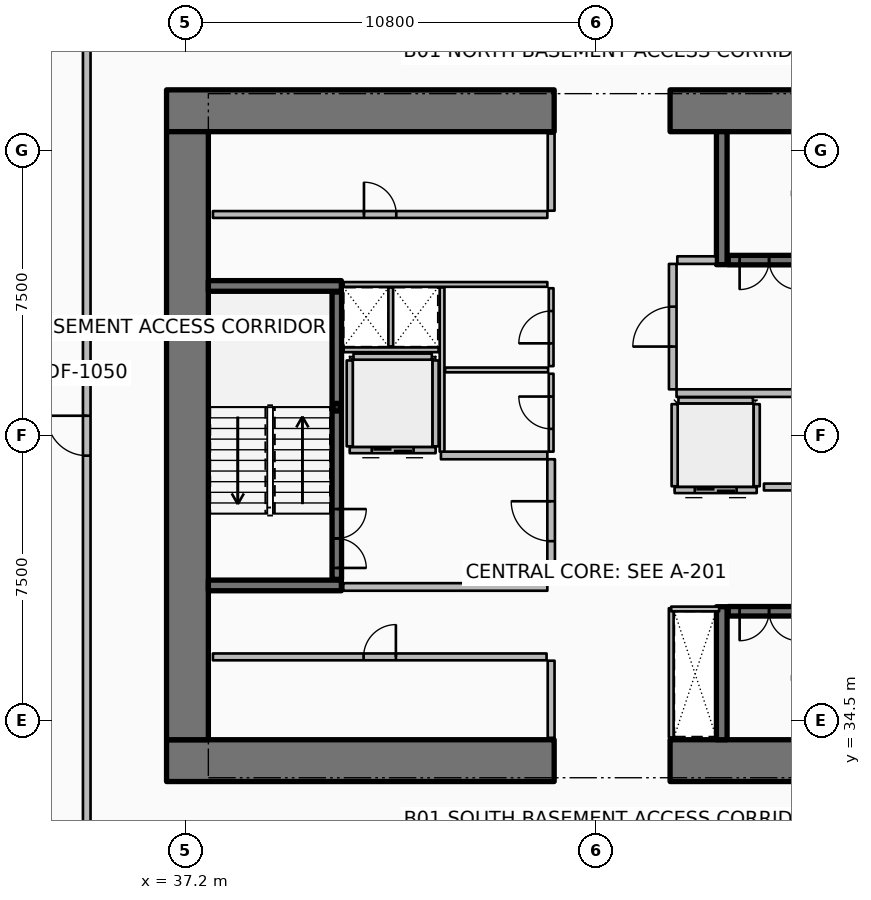
"""IFC4 building model, lengths in metres.
Left out: names, types, materials, properties, quantities, classifications, styles, units other than length and angle.
Written with IfcOpenShell. Run it as: python <this file> out.ifc"""

import sys

from ifc_helpers import new_model, si_unit, direction, frame, frame_2d, origin, origin_2d, place, context, subcontext, project, spatial, rectangle, hollow_rectangle, extrude, element, fill, save


model = new_model("IFC4")
c1 = context("Model", 3, precision=1e-05, world=origin(), true_north=direction((0.0, 1.0)))
c2 = subcontext(c1, "Body", "Model", "MODEL_VIEW")
j1 = project(units=[si_unit("LENGTHUNIT", "METRE"), si_unit("PLANEANGLEUNIT", "RADIAN")], contexts=[c1])
p1 = place(None, origin())
s1 = spatial("IfcSite", under=j1, at=p1, CompositionType="ELEMENT")
p2 = place(p1, origin())
s2 = spatial("IfcBuilding", under=s1, at=p2, CompositionType="ELEMENT")
p3 = place(p2, frame((0.0, 0.0, -3.8)))
s3 = spatial("IfcBuildingStorey", under=s2, at=p3, CompositionType="ELEMENT", Elevation=-3.8)
for number, where, z_axis, x_axis in (
    (1, (36.7, 33.45, 0.0), (0.0, 0.0, 1.0), (1.0, 0.0, 0.0)),
    (2, (49.95, 33.45, 0.0), (0.0, 0.0, 1.0), (1.0, 0.0, 0.0)),
    (3, (36.7, 50.55, 0.0), (0.0, 0.0, 1.0), (1.0, 0.0, 0.0)),
    (4, (49.95, 50.55, 0.0), (0.0, 0.0, 1.0), (1.0, 0.0, 0.0)),
):
    element("IfcWall", number, at=place(p3, frame(where, z_axis=z_axis, x_axis=x_axis)), inside=s3, PredefinedType="SHEAR", context=c2, shape_type="SweptSolid", body=[
        extrude(rectangle(XDim=10.2, YDim=1.1, at=frame_2d((5.1, 0.0))), origin(), (0.0, 0.0, 1.0), 3.8),
    ])
p4 = place(p3, frame((37.25, 34.0, 0.0), z_axis=(0.0, 0.0, 1.0), x_axis=(0.0, 1.0, 0.0)))
e5 = element("IfcWall", 5, at=p4, inside=s3, PredefinedType="SHEAR", context=c2, shape_type="SweptSolid", body=[
    extrude(rectangle(XDim=16.0, YDim=1.1, at=frame_2d((8.0, 0.0))), origin(), (0.0, 0.0, 1.0), 3.8),
])
for number, where, z_axis, x_axis in (
    (6, (37.8, 38.06, 0.0), (0.0, 0.0, 1.0), (1.0, 0.0, 0.0)),
    (7, (37.8, 45.94, 0.0), (0.0, 0.0, 1.0), (1.0, 0.0, 0.0)),
    (8, (51.31, 46.5, 0.0), (0.0, 0.0, 1.0), (0.0, 1.0, 0.0)),
    (9, (51.31, 34.0, 0.0), (0.0, 0.0, 1.0), (0.0, 1.0, 0.0)),
):
    element("IfcWall", number, at=place(p3, frame(where, z_axis=z_axis, x_axis=x_axis)), inside=s3, PredefinedType="SHEAR", context=c2, shape_type="SweptSolid", body=[
        extrude(rectangle(XDim=3.5, YDim=0.28, at=frame_2d((1.75, 0.0))), origin(), (0.0, 0.0, 1.0), 3.8),
    ])
p5 = place(p3, frame((41.18, 42.75, 0.0), z_axis=(0.0, 0.0, 1.0), x_axis=(1.0, 0.0, 0.0)))
e10 = element("IfcColumn", 10, at=p5, inside=s3, PredefinedType="COLUMN", context=c2, shape_type="SweptSolid", body=[
    extrude(hollow_rectangle(XDim=0.2, YDim=0.2, WallThickness=0.01, InnerFilletRadius=0.01, OuterFilletRadius=0.02, at=origin_2d()), origin(), (0.0, 0.0, 1.0), 1.695),
])
p6 = place(p3, frame((41.18, 38.22, 0.0), z_axis=(0.0, 0.0, 1.0), x_axis=(0.0, 1.0, 0.0)))
e11 = element("IfcWall", 11, at=p6, inside=s3, PredefinedType="SOLIDWALL", context=c2, shape_type="SweptSolid", body=[
    extrude(rectangle(XDim=7.56, YDim=0.25, at=frame_2d((3.78, 0.0))), origin(), (0.0, 0.0, 1.0), 3.48),
])
p7 = place(p6, frame((0.3, 0.0, 0.0)))
e12 = element("IfcOpeningElement", 12, at=p7, cuts=e11, PredefinedType="OPENING", context=c2, shape_type="SweptSolid", body=[
    extrude(rectangle(XDim=1.55, YDim=2.15, at=frame_2d((0.775, 1.075))), frame((0.0, 0.135, 0.0), z_axis=(0.0, -1.0, 0.0), x_axis=(1.0, 0.0, 0.0)), (0.0, 0.0, 1.0), 0.27),
])
p8 = place(p3, frame((51.48, 46.62, 0.0), z_axis=(0.0, 0.0, 1.0), x_axis=(1.0, 0.0, 0.0)))
e13 = element("IfcWall", 13, at=p8, inside=s3, PredefinedType="SOLIDWALL", context=c2, shape_type="SweptSolid", body=[
    extrude(rectangle(XDim=7.54, YDim=0.25, at=frame_2d((3.77, 0.0))), origin(), (0.0, 0.0, 1.0), 3.48),
])
p9 = place(p8, frame((0.3, 0.0, 0.0)))
e14 = element("IfcOpeningElement", 14, at=p9, cuts=e13, PredefinedType="OPENING", context=c2, shape_type="SweptSolid", body=[
    extrude(rectangle(XDim=1.55, YDim=2.15, at=frame_2d((0.775, 1.075))), frame((0.0, 0.135, 0.0), z_axis=(0.0, -1.0, 0.0), x_axis=(1.0, 0.0, 0.0)), (0.0, 0.0, 1.0), 0.27),
])
p10 = place(p3, frame((51.48, 37.38, 0.0), z_axis=(0.0, 0.0, 1.0), x_axis=(1.0, 0.0, 0.0)))
e15 = element("IfcWall", 15, at=p10, inside=s3, PredefinedType="SOLIDWALL", context=c2, shape_type="SweptSolid", body=[
    extrude(rectangle(XDim=7.54, YDim=0.25, at=frame_2d((3.77, 0.0))), origin(), (0.0, 0.0, 1.0), 3.48),
])
p11 = place(p10, frame((0.3, 0.0, 0.0)))
e16 = element("IfcOpeningElement", 16, at=p11, cuts=e15, PredefinedType="OPENING", context=c2, shape_type="SweptSolid", body=[
    extrude(rectangle(XDim=1.55, YDim=2.15, at=frame_2d((0.775, 1.075))), frame((0.0, 0.135, 0.0), z_axis=(0.0, -1.0, 0.0), x_axis=(1.0, 0.0, 0.0)), (0.0, 0.0, 1.0), 0.27),
])
p12 = place(p3, frame((43.78, 41.62, 0.0), z_axis=(0.0, 0.0, 1.0), x_axis=(-1.0, 0.0, 0.0)))
e17 = element("IfcWall", 17, at=p12, inside=s3, PredefinedType="PARTITIONING", context=c2, shape_type="SweptSolid", body=[
    extrude(rectangle(XDim=2.26, YDim=0.16, at=frame_2d((1.13, 0.0))), origin(), (0.0, 0.0, 1.0), 3.48),
])
p13 = place(p12, frame((0.58, 0.0, 0.0)))
e18 = element("IfcOpeningElement", 18, at=p13, cuts=e17, PredefinedType="OPENING", context=c2, shape_type="SweptSolid", body=[
    extrude(rectangle(XDim=1.1, YDim=2.1, at=frame_2d((0.55, 1.05))), frame((0.0, 0.09, 0.0), z_axis=(0.0, -1.0, 0.0), x_axis=(1.0, 0.0, 0.0)), (0.0, 0.0, 1.0), 0.18),
])
for number, where, z_axis, x_axis in (
    (19, (43.78, 41.72, 0.0), (0.0, 0.0, 1.0), (0.0, 1.0, 0.0)),
    (20, (41.52, 41.72, 0.0), (0.0, 0.0, 1.0), (0.0, 1.0, 0.0)),
):
    element("IfcWall", number, at=place(p3, frame(where, z_axis=z_axis, x_axis=x_axis)), inside=s3, PredefinedType="PARTITIONING", context=c2, shape_type="SweptSolid", body=[
        extrude(rectangle(XDim=2.26, YDim=0.16, at=frame_2d((1.13, 0.0))), origin(), (0.0, 0.0, 1.0), 3.48),
    ])
p14 = place(p3, frame((41.62, 44.08, 0.0), z_axis=(0.0, 0.0, 1.0), x_axis=(1.0, 0.0, 0.0)))
e21 = element("IfcWall", 21, at=p14, inside=s3, PredefinedType="PARTITIONING", context=c2, shape_type="SweptSolid", body=[
    extrude(rectangle(XDim=2.06, YDim=0.16, at=frame_2d((1.03, 0.0))), origin(), (0.0, 0.0, 1.0), 3.48),
])
p15 = place(p3, frame((52.23, 40.57, 0.0), z_axis=(0.0, 0.0, 1.0), x_axis=(-1.0, 0.0, 0.0)))
e22 = element("IfcWall", 22, at=p15, inside=s3, PredefinedType="PARTITIONING", context=c2, shape_type="SweptSolid", body=[
    extrude(rectangle(XDim=2.16, YDim=0.16, at=frame_2d((1.08, 0.0))), origin(), (0.0, 0.0, 1.0), 3.48),
])
p16 = place(p15, frame((0.53, 0.0, 0.0)))
e23 = element("IfcOpeningElement", 23, at=p16, cuts=e22, PredefinedType="OPENING", context=c2, shape_type="SweptSolid", body=[
    extrude(rectangle(XDim=1.1, YDim=2.1, at=frame_2d((0.55, 1.05))), frame((0.0, 0.09, 0.0), z_axis=(0.0, -1.0, 0.0), x_axis=(1.0, 0.0, 0.0)), (0.0, 0.0, 1.0), 0.18),
])
for number, where, z_axis, x_axis in (
    (24, (52.23, 40.67, 0.0), (0.0, 0.0, 1.0), (0.0, 1.0, 0.0)),
    (25, (50.07, 40.67, 0.0), (0.0, 0.0, 1.0), (0.0, 1.0, 0.0)),
):
    element("IfcWall", number, at=place(p3, frame(where, z_axis=z_axis, x_axis=x_axis)), inside=s3, PredefinedType="PARTITIONING", context=c2, shape_type="SweptSolid", body=[
        extrude(rectangle(XDim=2.16, YDim=0.16, at=frame_2d((1.08, 0.0))), origin(), (0.0, 0.0, 1.0), 3.48),
    ])
p17 = place(p3, frame((50.17, 42.93, 0.0), z_axis=(0.0, 0.0, 1.0), x_axis=(1.0, 0.0, 0.0)))
e26 = element("IfcWall", 26, at=p17, inside=s3, PredefinedType="PARTITIONING", context=c2, shape_type="SweptSolid", body=[
    extrude(rectangle(XDim=1.96, YDim=0.16, at=frame_2d((0.98, 0.0))), origin(), (0.0, 0.0, 1.0), 3.48),
])
p18 = place(p3, frame((37.92, 36.18, 0.0), z_axis=(0.0, 0.0, 1.0), x_axis=(1.0, 0.0, 0.0)))
e27 = element("IfcWall", 27, at=p18, inside=s3, PredefinedType="PARTITIONING", context=c2, shape_type="SweptSolid", body=[
    extrude(rectangle(XDim=8.78, YDim=0.18, at=frame_2d((4.39, 0.0))), origin(), (0.0, 0.0, 1.0), 3.48),
])
p19 = place(p18, frame((3.965, 0.0, 0.0)))
e28 = element("IfcOpeningElement", 28, at=p19, cuts=e27, PredefinedType="OPENING", context=c2, shape_type="SweptSolid", body=[
    extrude(rectangle(XDim=0.85, YDim=2.06, at=frame_2d((0.425, 1.03))), frame((0.0, 0.1, 0.0), z_axis=(0.0, -1.0, 0.0), x_axis=(1.0, 0.0, 0.0)), (0.0, 0.0, 1.0), 0.2),
])
p20 = place(p3, frame((46.82, 34.05, 0.0), z_axis=(0.0, 0.0, 1.0), x_axis=(0.0, 1.0, 0.0)))
e29 = element("IfcWall", 29, at=p20, inside=s3, PredefinedType="PARTITIONING", context=c2, shape_type="SweptSolid", body=[
    extrude(rectangle(XDim=2.03, YDim=0.18, at=frame_2d((1.015, 0.0))), origin(), (0.0, 0.0, 1.0), 3.48),
])
p21 = place(p3, frame((37.92, 47.82, 0.0), z_axis=(0.0, 0.0, 1.0), x_axis=(1.0, 0.0, 0.0)))
e30 = element("IfcWall", 30, at=p21, inside=s3, PredefinedType="PARTITIONING", context=c2, shape_type="SweptSolid", body=[
    extrude(rectangle(XDim=8.8, YDim=0.18, at=frame_2d((4.4, 0.0))), origin(), (0.0, 0.0, 1.0), 3.48),
])
p22 = place(p21, frame((3.975, 0.0, 0.0)))
e31 = element("IfcOpeningElement", 31, at=p22, cuts=e30, PredefinedType="OPENING", context=c2, shape_type="SweptSolid", body=[
    extrude(rectangle(XDim=0.85, YDim=2.06, at=frame_2d((0.425, 1.03))), frame((0.0, 0.1, 0.0), z_axis=(0.0, -1.0, 0.0), x_axis=(1.0, 0.0, 0.0)), (0.0, 0.0, 1.0), 0.2),
])
p23 = place(p3, frame((46.82, 47.92, 0.0), z_axis=(0.0, 0.0, 1.0), x_axis=(0.0, 1.0, 0.0)))
e32 = element("IfcWall", 32, at=p23, inside=s3, PredefinedType="PARTITIONING", context=c2, shape_type="SweptSolid", body=[
    extrude(rectangle(XDim=2.03, YDim=0.18, at=frame_2d((1.015, 0.0))), origin(), (0.0, 0.0, 1.0), 3.48),
])
p24 = place(p3, frame((52.42, 40.65, 0.0), z_axis=(0.0, 0.0, 1.0), x_axis=(1.0, 0.0, 0.0)))
e33 = element("IfcWall", 33, at=p24, inside=s3, PredefinedType="PARTITIONING", context=c2, shape_type="SweptSolid", body=[
    extrude(rectangle(XDim=6.5, YDim=0.18, at=frame_2d((3.25, 0.0))), origin(), (0.0, 0.0, 1.0), 3.48),
])
p25 = place(p24, frame((2.825, 0.0, 0.0)))
e34 = element("IfcOpeningElement", 34, at=p25, cuts=e33, PredefinedType="OPENING", context=c2, shape_type="SweptSolid", body=[
    extrude(rectangle(XDim=0.85, YDim=2.06, at=frame_2d((0.425, 1.03))), frame((0.0, 0.1, 0.0), z_axis=(0.0, -1.0, 0.0), x_axis=(1.0, 0.0, 0.0)), (0.0, 0.0, 1.0), 0.2),
])
p26 = place(p3, frame((41.35, 38.02, 0.0), z_axis=(0.0, 0.0, 1.0), x_axis=(1.0, 0.0, 0.0)))
e35 = element("IfcWall", 35, at=p26, inside=s3, PredefinedType="PARTITIONING", context=c2, shape_type="SweptSolid", body=[
    extrude(rectangle(XDim=5.37, YDim=0.2, at=frame_2d((2.685, 0.0))), origin(), (0.0, 0.0, 1.0), 3.48),
])
p27 = place(p3, frame((43.92, 41.48, 0.0), z_axis=(0.0, 0.0, 1.0), x_axis=(1.0, 0.0, 0.0)))
e36 = element("IfcWall", 36, at=p27, inside=s3, PredefinedType="PARTITIONING", context=c2, shape_type="SweptSolid", body=[
    extrude(rectangle(XDim=2.8, YDim=0.2, at=frame_2d((1.4, 0.0))), origin(), (0.0, 0.0, 1.0), 3.48),
])
p28 = place(p3, frame((46.82, 38.12, 0.0), z_axis=(0.0, 0.0, 1.0), x_axis=(0.0, 1.0, 0.0)))
e37 = element("IfcWall", 37, at=p28, inside=s3, PredefinedType="PARTITIONING", context=c2, shape_type="SweptSolid", body=[
    extrude(rectangle(XDim=3.26, YDim=0.2, at=frame_2d((1.63, 0.0))), origin(), (0.0, 0.0, 1.0), 3.48),
])
p29 = place(p28, frame((1.105, 0.0, 0.0)))
e38 = element("IfcOpeningElement", 38, at=p29, cuts=e37, PredefinedType="OPENING", context=c2, shape_type="SweptSolid", body=[
    extrude(rectangle(XDim=1.05, YDim=2.1, at=frame_2d((0.525, 1.05))), frame((0.0, 0.11, 0.0), z_axis=(0.0, -1.0, 0.0), x_axis=(1.0, 0.0, 0.0)), (0.0, 0.0, 1.0), 0.22),
])
p30 = place(p3, frame((50.12, 43.12, 0.0), z_axis=(0.0, 0.0, 1.0), x_axis=(1.0, 0.0, 0.0)))
e39 = element("IfcWall", 39, at=p30, inside=s3, PredefinedType="PARTITIONING", context=c2, shape_type="SweptSolid", body=[
    extrude(rectangle(XDim=8.88, YDim=0.2, at=frame_2d((4.44, 0.0))), origin(), (0.0, 0.0, 1.0), 3.48),
])
p31 = place(p3, frame((50.14, 46.62, 0.0), z_axis=(0.0, 0.0, 1.0), x_axis=(1.0, 0.0, 0.0)))
e40 = element("IfcWall", 40, at=p31, inside=s3, PredefinedType="PARTITIONING", context=c2, shape_type="SweptSolid", body=[
    extrude(rectangle(XDim=1.02, YDim=0.2, at=frame_2d((0.51, 0.0))), origin(), (0.0, 0.0, 1.0), 3.48),
])
p32 = place(p3, frame((50.02, 43.22, 0.0), z_axis=(0.0, 0.0, 1.0), x_axis=(0.0, 1.0, 0.0)))
e41 = element("IfcWall", 41, at=p32, inside=s3, PredefinedType="PARTITIONING", context=c2, shape_type="SweptSolid", body=[
    extrude(rectangle(XDim=3.3, YDim=0.2, at=frame_2d((1.65, 0.0))), origin(), (0.0, 0.0, 1.0), 3.48),
])
p33 = place(p32, frame((1.125, 0.0, 0.0)))
e42 = element("IfcOpeningElement", 42, at=p33, cuts=e41, PredefinedType="OPENING", context=c2, shape_type="SweptSolid", body=[
    extrude(rectangle(XDim=1.05, YDim=2.1, at=frame_2d((0.525, 1.05))), frame((0.0, 0.11, 0.0), z_axis=(0.0, -1.0, 0.0), x_axis=(1.0, 0.0, 0.0)), (0.0, 0.0, 1.0), 0.22),
])
p34 = place(p3, frame((41.36, 45.98, 0.0), z_axis=(0.0, 0.0, 1.0), x_axis=(1.0, 0.0, 0.0)))
e43 = element("IfcWall", 43, at=p34, inside=s3, PredefinedType="PARTITIONING", context=c2, shape_type="SweptSolid", body=[
    extrude(rectangle(XDim=5.36, YDim=0.125, at=frame_2d((2.68, 0.0))), origin(), (0.0, 0.0, 1.0), 2.92),
])
p35 = place(p3, frame((41.36, 44.26, 0.0), z_axis=(0.0, 0.0, 1.0), x_axis=(1.0, 0.0, 0.0)))
e44 = element("IfcWall", 44, at=p35, inside=s3, PredefinedType="PARTITIONING", context=c2, shape_type="SweptSolid", body=[
    extrude(rectangle(XDim=2.5, YDim=0.125, at=frame_2d((1.25, 0.0))), origin(), (0.0, 0.0, 1.0), 2.92),
])
p36 = place(p3, frame((42.6, 44.35, 0.0), z_axis=(0.0, 0.0, 1.0), x_axis=(0.0, 1.0, 0.0)))
e45 = element("IfcWall", 45, at=p36, inside=s3, PredefinedType="PARTITIONING", context=c2, shape_type="SweptSolid", body=[
    extrude(rectangle(XDim=1.55, YDim=0.125, at=frame_2d((0.775, 0.0))), origin(), (0.0, 0.0, 1.0), 2.92),
])
p37 = place(p3, frame((49.98, 34.06, 0.0), z_axis=(0.0, 0.0, 1.0), x_axis=(0.0, 1.0, 0.0)))
e46 = element("IfcWall", 46, at=p37, inside=s3, PredefinedType="PARTITIONING", context=c2, shape_type="SweptSolid", body=[
    extrude(rectangle(XDim=3.4, YDim=0.125, at=frame_2d((1.7, 0.0))), origin(), (0.0, 0.0, 1.0), 2.92),
])
p38 = place(p3, frame((49.98, 37.44, 0.0), z_axis=(0.0, 0.0, 1.0), x_axis=(1.0, 0.0, 0.0)))
e47 = element("IfcWall", 47, at=p38, inside=s3, PredefinedType="PARTITIONING", context=c2, shape_type="SweptSolid", body=[
    extrude(rectangle(XDim=1.26, YDim=0.125, at=frame_2d((0.63, 0.0))), origin(), (0.0, 0.0, 1.0), 2.92),
])
p39 = place(p3, frame((43.95, 41.58, 0.0), z_axis=(0.0, 0.0, 1.0), x_axis=(0.0, 1.0, 0.0)))
e48 = element("IfcWall", 48, at=p39, inside=s3, PredefinedType="PARTITIONING", context=c2, shape_type="SweptSolid", body=[
    extrude(rectangle(XDim=4.32, YDim=0.125, at=frame_2d((2.16, 0.0))), origin(), (0.0, 0.0, 1.0), 2.92),
])
p40 = place(p3, frame((44.03, 43.73, 0.0), z_axis=(0.0, 0.0, 1.0), x_axis=(1.0, 0.0, 0.0)))
e49 = element("IfcWall", 49, at=p40, inside=s3, PredefinedType="PARTITIONING", context=c2, shape_type="SweptSolid", body=[
    extrude(rectangle(XDim=2.71, YDim=0.125, at=frame_2d((1.355, 0.0))), origin(), (0.0, 0.0, 1.0), 2.92),
])
p41 = place(p3, frame((46.82, 41.58, 0.0), z_axis=(0.0, 0.0, 1.0), x_axis=(0.0, 1.0, 0.0)))
e50 = element("IfcWall", 50, at=p41, inside=s3, PredefinedType="PARTITIONING", context=c2, shape_type="SweptSolid", body=[
    extrude(rectangle(XDim=2.05, YDim=0.125, at=frame_2d((1.025, 0.0))), origin(), (0.0, 0.0, 1.0), 2.92),
])
p42 = place(p41, frame((0.6, 0.0, 0.0)))
e51 = element("IfcOpeningElement", 51, at=p42, cuts=e50, PredefinedType="OPENING", context=c2, shape_type="SweptSolid", body=[
    extrude(rectangle(XDim=0.85, YDim=2.06, at=frame_2d((0.425, 1.03))), frame((0.0, 0.073, 0.0), z_axis=(0.0, -1.0, 0.0), x_axis=(1.0, 0.0, 0.0)), (0.0, 0.0, 1.0), 0.145),
])
p43 = place(p3, frame((46.82, 43.83, 0.0), z_axis=(0.0, 0.0, 1.0), x_axis=(0.0, 1.0, 0.0)))
e52 = element("IfcWall", 52, at=p43, inside=s3, PredefinedType="PARTITIONING", context=c2, shape_type="SweptSolid", body=[
    extrude(rectangle(XDim=2.05, YDim=0.125, at=frame_2d((1.025, 0.0))), origin(), (0.0, 0.0, 1.0), 2.92),
])
p44 = place(p43, frame((0.6, 0.0, 0.0)))
e53 = element("IfcOpeningElement", 53, at=p44, cuts=e52, PredefinedType="OPENING", context=c2, shape_type="SweptSolid", body=[
    extrude(rectangle(XDim=0.85, YDim=2.06, at=frame_2d((0.425, 1.03))), frame((0.0, 0.073, 0.0), z_axis=(0.0, -1.0, 0.0), x_axis=(1.0, 0.0, 0.0)), (0.0, 0.0, 1.0), 0.145),
])
p45 = place(p3, frame((34.6, 30.95, 0.0), z_axis=(0.0, 0.0, 1.0), x_axis=(0.0, 1.0, 0.0)))
e54 = element("IfcWall", 54, at=p45, inside=s3, PredefinedType="PARTITIONING", context=c2, shape_type="SweptSolid", body=[
    extrude(rectangle(XDim=22.1, YDim=0.2, at=frame_2d((11.05, 0.0))), origin(), (0.0, 0.0, 1.0), 2.771),
])
p46 = place(p45, frame((10.525, 0.0, 0.0)))
e55 = element("IfcOpeningElement", 55, at=p46, cuts=e54, PredefinedType="OPENING", context=c2, shape_type="SweptSolid", body=[
    extrude(rectangle(XDim=1.05, YDim=2.1, at=frame_2d((0.525, 1.05))), frame((0.0, 0.11, 0.0), z_axis=(0.0, -1.0, 0.0), x_axis=(1.0, 0.0, 0.0)), (0.0, 0.0, 1.0), 0.22),
])
p47 = place(p7, origin())
e56 = element("IfcDoor", 56, at=p47, inside=s3, OperationType="DOUBLE_DOOR_SINGLE_SWING", PredefinedType="DOOR", context=c2, shape_type="SweptSolid", body=[
    extrude(rectangle(XDim=1.55, YDim=2.15, at=frame_2d((0.775, 1.075))), frame((0.0, 0.025, 0.0), z_axis=(0.0, -1.0, 0.0), x_axis=(1.0, 0.0, 0.0)), (0.0, 0.0, 1.0), 0.05),
])
fill(e12, e56)
p48 = place(p9, origin())
e57 = element("IfcDoor", 57, at=p48, inside=s3, OperationType="DOUBLE_DOOR_SINGLE_SWING", PredefinedType="DOOR", context=c2, shape_type="SweptSolid", body=[
    extrude(rectangle(XDim=1.55, YDim=2.15, at=frame_2d((0.775, 1.075))), frame((0.0, 0.025, 0.0), z_axis=(0.0, -1.0, 0.0), x_axis=(1.0, 0.0, 0.0)), (0.0, 0.0, 1.0), 0.05),
])
fill(e14, e57)
p49 = place(p11, origin())
e58 = element("IfcDoor", 58, at=p49, inside=s3, OperationType="DOUBLE_DOOR_SINGLE_SWING", PredefinedType="DOOR", context=c2, shape_type="SweptSolid", body=[
    extrude(rectangle(XDim=1.55, YDim=2.15, at=frame_2d((0.775, 1.075))), frame((0.0, 0.025, 0.0), z_axis=(0.0, -1.0, 0.0), x_axis=(1.0, 0.0, 0.0)), (0.0, 0.0, 1.0), 0.05),
])
fill(e16, e58)
p50 = place(p13, origin())
e59 = element("IfcDoor", 59, at=p50, inside=s3, OperationType="DOUBLE_DOOR_SLIDING", PredefinedType="DOOR", context=c2, shape_type="SweptSolid", body=[
    extrude(rectangle(XDim=1.1, YDim=2.1, at=frame_2d((0.55, 1.05))), frame((0.0, 0.025, 0.0), z_axis=(0.0, -1.0, 0.0), x_axis=(1.0, 0.0, 0.0)), (0.0, 0.0, 1.0), 0.05),
])
fill(e18, e59)
p51 = place(p16, origin())
e60 = element("IfcDoor", 60, at=p51, inside=s3, OperationType="DOUBLE_DOOR_SLIDING", PredefinedType="DOOR", context=c2, shape_type="SweptSolid", body=[
    extrude(rectangle(XDim=1.1, YDim=2.1, at=frame_2d((0.55, 1.05))), frame((0.0, 0.025, 0.0), z_axis=(0.0, -1.0, 0.0), x_axis=(1.0, 0.0, 0.0)), (0.0, 0.0, 1.0), 0.05),
])
fill(e23, e60)
p52 = place(p19, origin())
e61 = element("IfcDoor", 61, at=p52, inside=s3, OperationType="SINGLE_SWING_RIGHT", PredefinedType="DOOR", context=c2, shape_type="SweptSolid", body=[
    extrude(rectangle(XDim=0.85, YDim=2.06, at=frame_2d((0.425, 1.03))), frame((0.0, 0.025, 0.0), z_axis=(0.0, -1.0, 0.0), x_axis=(1.0, 0.0, 0.0)), (0.0, 0.0, 1.0), 0.05),
])
fill(e28, e61)
p53 = place(p22, origin())
e62 = element("IfcDoor", 62, at=p53, inside=s3, OperationType="SINGLE_SWING_LEFT", PredefinedType="DOOR", context=c2, shape_type="SweptSolid", body=[
    extrude(rectangle(XDim=0.85, YDim=2.06, at=frame_2d((0.425, 1.03))), frame((0.0, 0.025, 0.0), z_axis=(0.0, -1.0, 0.0), x_axis=(1.0, 0.0, 0.0)), (0.0, 0.0, 1.0), 0.05),
])
fill(e31, e62)
p54 = place(p29, origin())
e63 = element("IfcDoor", 63, at=p54, inside=s3, OperationType="SINGLE_SWING_RIGHT", PredefinedType="DOOR", context=c2, shape_type="SweptSolid", body=[
    extrude(rectangle(XDim=1.05, YDim=2.1, at=frame_2d((0.525, 1.05))), frame((0.0, 0.025, 0.0), z_axis=(0.0, -1.0, 0.0), x_axis=(1.0, 0.0, 0.0)), (0.0, 0.0, 1.0), 0.05),
])
fill(e38, e63)
p55 = place(p33, origin())
e64 = element("IfcDoor", 64, at=p55, inside=s3, OperationType="SINGLE_SWING_LEFT", PredefinedType="DOOR", context=c2, shape_type="SweptSolid", body=[
    extrude(rectangle(XDim=1.05, YDim=2.1, at=frame_2d((0.525, 1.05))), frame((0.0, 0.025, 0.0), z_axis=(0.0, -1.0, 0.0), x_axis=(1.0, 0.0, 0.0)), (0.0, 0.0, 1.0), 0.05),
])
fill(e42, e64)
p56 = place(p42, origin())
e65 = element("IfcDoor", 65, at=p56, inside=s3, OperationType="SINGLE_SWING_RIGHT", PredefinedType="DOOR", context=c2, shape_type="SweptSolid", body=[
    extrude(rectangle(XDim=0.85, YDim=2.06, at=frame_2d((0.425, 1.03))), frame((0.0, 0.025, 0.0), z_axis=(0.0, -1.0, 0.0), x_axis=(1.0, 0.0, 0.0)), (0.0, 0.0, 1.0), 0.05),
])
fill(e51, e65)
p57 = place(p44, origin())
e66 = element("IfcDoor", 66, at=p57, inside=s3, OperationType="SINGLE_SWING_LEFT", PredefinedType="DOOR", context=c2, shape_type="SweptSolid", body=[
    extrude(rectangle(XDim=0.85, YDim=2.06, at=frame_2d((0.425, 1.03))), frame((0.0, 0.025, 0.0), z_axis=(0.0, -1.0, 0.0), x_axis=(1.0, 0.0, 0.0)), (0.0, 0.0, 1.0), 0.05),
])
fill(e53, e66)
p58 = place(p46, origin())
e67 = element("IfcDoor", 67, at=p58, inside=s3, OperationType="SINGLE_SWING_RIGHT", PredefinedType="DOOR", context=c2, shape_type="SweptSolid", body=[
    extrude(rectangle(XDim=1.05, YDim=2.1, at=frame_2d((0.525, 1.05))), frame((0.0, 0.025, 0.0), z_axis=(0.0, -1.0, 0.0), x_axis=(1.0, 0.0, 0.0)), (0.0, 0.0, 1.0), 0.05),
])
fill(e55, e67)
save(model, sys.argv[1])
